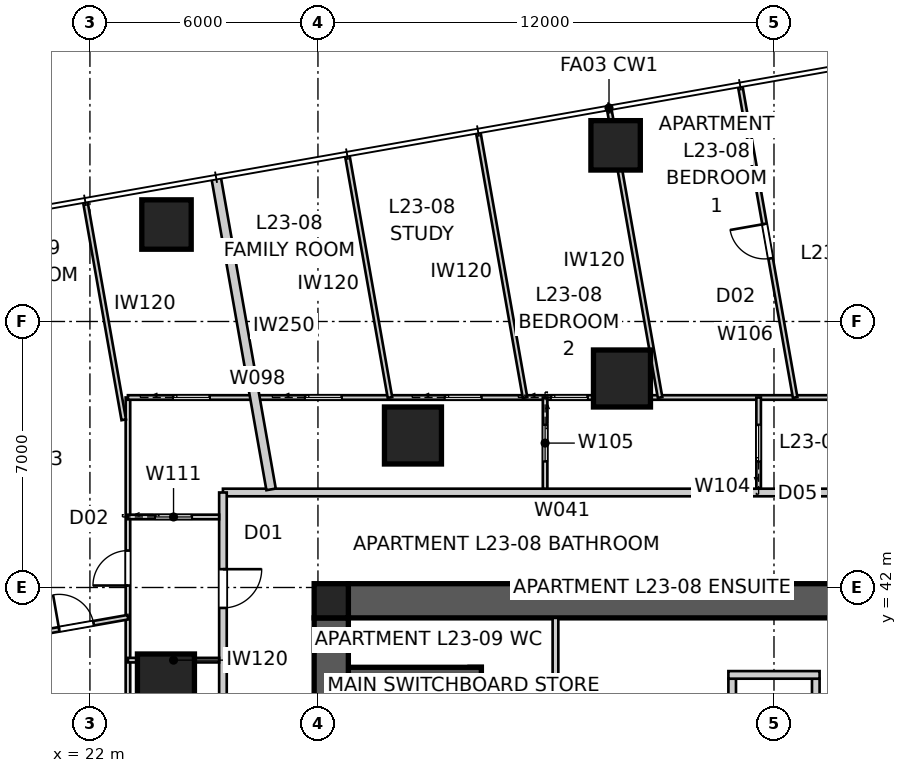
"""IFC4 building model, lengths in metres.
Left out: names, types, materials, properties, quantities, classifications, styles, units other than length and angle.
Written with IfcOpenShell. Run it as: python <this file> out.ifc"""

import sys

from ifc_helpers import new_model, si_unit, direction, frame, frame_2d, origin, origin_2d, place, context, subcontext, project, spatial, polyline, rectangle, outline, extrude, element, fill, save


model = new_model("IFC4")
c1 = context("Model", 3, precision=1e-05, world=origin(), true_north=direction((0.0, 1.0)))
c2 = subcontext(c1, "Body", "Model", "MODEL_VIEW")
j1 = project(units=[si_unit("LENGTHUNIT", "METRE"), si_unit("PLANEANGLEUNIT", "RADIAN")], contexts=[c1])
p1 = place(None, origin())
s1 = spatial("IfcSite", under=j1, at=p1, CompositionType="ELEMENT")
p2 = place(p1, origin())
s2 = spatial("IfcBuilding", under=s1, at=p2, CompositionType="ELEMENT")
p3 = place(p2, frame((0.0, 0.0, 86.2)))
s3 = spatial("IfcBuildingStorey", under=s2, at=p3, CompositionType="ELEMENT", Elevation=86.2)
p4 = place(p3, frame((28.8, 41.65, 0.0), z_axis=(0.0, 0.0, 1.0), x_axis=(1.0, 0.0, 0.0)))
e1 = element("IfcWall", 1, at=p4, inside=s3, PredefinedType="SHEAR", context=c2, shape_type="SweptSolid", body=[
    extrude(outline(polyline([(0.0, -0.45), (22.4, -0.45), (22.4, -0.025), (22.85, -0.025), (22.85, 0.025), (22.4, 0.025), (22.4, 0.45), (0.0, 0.45), (0.0, 0.025), (-0.45, 0.025), (-0.45, -0.025), (0.0, -0.025), (0.0, -0.45)])), origin(), (0.0, 0.0, 1.0), 3.4),
])
p5 = place(p3, frame((28.35, 41.2, 0.0), z_axis=(0.0, 0.0, 1.0), x_axis=(0.0, -1.0, 0.0)))
e2 = element("IfcWall", 2, at=p5, inside=s3, PredefinedType="SHEAR", context=c2, shape_type="SweptSolid", body=[
    extrude(outline(polyline([(0.0, -0.45), (22.4, -0.45), (22.4, -0.025), (22.85, -0.025), (22.85, 0.025), (22.4, 0.025), (22.4, 0.45), (0.0, 0.45), (0.0, 0.025), (-0.45, 0.025), (-0.45, -0.025), (0.0, -0.025), (0.0, -0.45)])), origin(), (0.0, 0.0, 1.0), 3.4),
])
p6 = place(p5, frame((11.14, 0.0, 0.0)))
e3 = element("IfcOpeningElement", 3, at=p6, cuts=e2, PredefinedType="OPENING", context=c2, shape_type="SweptSolid", body=[
    extrude(rectangle(XDim=1.02, YDim=2.4, at=frame_2d((0.51, 1.2))), frame((0.0, 0.46, 0.0), z_axis=(0.0, -1.0, 0.0), x_axis=(1.0, 0.0, 0.0)), (0.0, 0.0, 1.0), 0.92),
])
p7 = place(p3, frame((32.15, 32.2, 0.0), z_axis=(0.0, 0.0, 1.0), x_axis=(0.0, 1.0, 0.0)))
e4 = element("IfcWall", 4, at=p7, inside=s3, PredefinedType="SHEAR", context=c2, shape_type="SweptSolid", body=[
    extrude(rectangle(XDim=7.7, YDim=0.3, at=frame_2d((3.85, 0.0))), origin(), (0.0, 0.0, 1.0), 3.4),
])
p8 = place(p3, frame((28.8, 39.75, 0.0), z_axis=(0.0, 0.0, 1.0), x_axis=(1.0, 0.0, 0.0)))
e5 = element("IfcWall", 5, at=p8, inside=s3, PredefinedType="SHEAR", context=c2, shape_type="SweptSolid", body=[
    extrude(rectangle(XDim=3.5, YDim=0.3, at=frame_2d((1.75, 0.0))), origin(), (0.0, 0.0, 1.0), 3.4),
])
for number, where, z_axis, x_axis in (
    (6, (38.9, 37.6, 0.0), (0.0, 0.0, 1.0), (0.0, 1.0, 0.0)),
    (7, (41.1, 37.6, 0.0), (0.0, 0.0, 1.0), (0.0, 1.0, 0.0)),
):
    element("IfcWall", number, at=place(p3, frame(where, z_axis=z_axis, x_axis=x_axis)), inside=s3, PredefinedType="SOLIDWALL", context=c2, shape_type="SweptSolid", body=[
        extrude(rectangle(XDim=2.0, YDim=0.2, at=frame_2d((1.0, 0.0))), origin(), (0.0, 0.0, 1.0), 3.4),
    ])
p9 = place(p3, frame((38.8, 39.7, 0.0), z_axis=(0.0, 0.0, 1.0), x_axis=(1.0, 0.0, 0.0)))
e8 = element("IfcWall", 8, at=p9, inside=s3, PredefinedType="SOLIDWALL", context=c2, shape_type="SweptSolid", body=[
    extrude(rectangle(XDim=2.4, YDim=0.2, at=frame_2d((1.2, 0.0))), origin(), (0.0, 0.0, 1.0), 3.4),
])
p10 = place(p3, frame((28.35, 41.65, 0.0), z_axis=(0.0, 0.0, 1.0), x_axis=(1.0, 0.0, 0.0)))
e9 = element("IfcColumn", 9, at=p10, inside=s3, PredefinedType="COLUMN", context=c2, shape_type="SweptSolid", body=[
    extrude(rectangle(XDim=0.9, YDim=0.9, at=origin_2d()), origin(), (0.0, 0.0, 1.0), 3.4),
])
for number, where, z_axis, x_axis in (
    (10, (35.833, 53.635, 0.0), (0.0, 0.0, 1.0), (1.0, 0.0, 0.0)),
    (11, (24.015, 51.552, 0.0), (0.0, 0.0, 1.0), (1.0, 0.0, 0.0)),
):
    element("IfcColumn", number, at=place(p3, frame(where, z_axis=z_axis, x_axis=x_axis)), inside=s3, PredefinedType="COLUMN", context=c2, shape_type="SweptSolid", body=[
        extrude(rectangle(XDim=1.3, YDim=1.3, at=origin_2d()), origin(), (0.0, 0.0, 1.0), 3.4),
    ])
for number, where, z_axis, x_axis in (
    (12, (36.0, 47.5, 0.0), (0.0, 0.0, 1.0), (1.0, 0.0, 0.0)),
    (13, (30.5, 46.0, 0.0), (0.0, 0.0, 1.0), (1.0, 0.0, 0.0)),
    (14, (24.0, 39.5, 0.0), (0.0, 0.0, 1.0), (1.0, 0.0, 0.0)),
):
    element("IfcColumn", number, at=place(p3, frame(where, z_axis=z_axis, x_axis=x_axis)), inside=s3, PredefinedType="COLUMN", context=c2, shape_type="SweptSolid", body=[
        extrude(rectangle(XDim=1.5, YDim=1.5, at=origin_2d()), origin(), (0.0, 0.0, 1.0), 3.4),
    ])
p11 = place(p3, frame((54.5, 44.5, 0.0), z_axis=(0.0, 0.0, 1.0), x_axis=(-1.0, 0.0, 0.0)))
e15 = element("IfcWall", 15, at=p11, inside=s3, PredefinedType="PARTITIONING", context=c2, shape_type="SweptSolid", body=[
    extrude(rectangle(XDim=29.0, YDim=0.2, at=frame_2d((14.5, 0.0))), origin(), (0.0, 0.0, 1.0), 3.25),
])
p12 = place(p11, frame((10.129, 0.0, 0.0)))
e16 = element("IfcOpeningElement", 16, at=p12, cuts=e15, PredefinedType="OPENING", context=c2, shape_type="SweptSolid", body=[
    extrude(rectangle(XDim=1.02, YDim=2.34, at=frame_2d((0.51, 1.17))), frame((0.0, 0.11, 0.0), z_axis=(0.0, -1.0, 0.0), x_axis=(1.0, 0.0, 0.0)), (0.0, 0.0, 1.0), 0.22),
])
p13 = place(p11, frame((3.065, 0.0, 0.0)))
e17 = element("IfcOpeningElement", 17, at=p13, cuts=e15, PredefinedType="OPENING", context=c2, shape_type="SweptSolid", body=[
    extrude(rectangle(XDim=1.02, YDim=2.1, at=frame_2d((0.51, 1.05))), frame((0.0, 0.11, 0.0), z_axis=(0.0, -1.0, 0.0), x_axis=(1.0, 0.0, 0.0)), (0.0, 0.0, 1.0), 0.22),
])
p14 = place(p3, frame((25.5, 44.5, 0.0), z_axis=(0.0, 0.0, 1.0), x_axis=(0.0, -1.0, 0.0)))
e18 = element("IfcWall", 18, at=p14, inside=s3, PredefinedType="PARTITIONING", context=c2, shape_type="SweptSolid", body=[
    extrude(rectangle(XDim=29.0, YDim=0.2, at=frame_2d((14.5, 0.0))), origin(), (0.0, 0.0, 1.0), 3.25),
])
p15 = place(p14, frame((12.263, 0.0, 0.0)))
e19 = element("IfcOpeningElement", 19, at=p15, cuts=e18, PredefinedType="OPENING", context=c2, shape_type="SweptSolid", body=[
    extrude(rectangle(XDim=1.02, YDim=2.34, at=frame_2d((0.51, 1.17))), frame((0.0, 0.11, 0.0), z_axis=(0.0, -1.0, 0.0), x_axis=(1.0, 0.0, 0.0)), (0.0, 0.0, 1.0), 0.22),
])
p16 = place(p14, frame((2.018, 0.0, 0.0)))
e20 = element("IfcOpeningElement", 20, at=p16, cuts=e18, PredefinedType="OPENING", context=c2, shape_type="SweptSolid", body=[
    extrude(rectangle(XDim=1.02, YDim=2.34, at=frame_2d((0.51, 1.17))), frame((0.0, 0.11, 0.0), z_axis=(0.0, -1.0, 0.0), x_axis=(1.0, 0.0, 0.0)), (0.0, 0.0, 1.0), 0.22),
])
p17 = place(p3, frame((25.318, 52.797, 0.0), z_axis=(0.0, 0.0, 1.0), x_axis=(0.173651756605, -0.984807121942, 0.0)))
e21 = element("IfcWall", 21, at=p17, inside=s3, PredefinedType="PARTITIONING", context=c2, shape_type="SweptSolid", body=[
    extrude(rectangle(XDim=8.341, YDim=0.25, at=frame_2d((4.171, 0.0))), origin(), (0.0, 0.0, 1.0), 3.25),
])
p18 = place(p3, frame((34.25, 41.2, 0.0), z_axis=(0.0, 0.0, 1.0), x_axis=(0.0, -1.0, 0.0)))
e22 = element("IfcWall", 22, at=p18, inside=s3, PredefinedType="SOLIDWALL", context=c2, shape_type="SweptSolid", body=[
    extrude(rectangle(XDim=5.95, YDim=0.15, at=frame_2d((2.975, 0.0))), origin(), (0.0, 0.0, 1.0), 3.25),
])
p19 = place(p18, frame((2.515, 0.0, 0.0)))
e23 = element("IfcOpeningElement", 23, at=p19, cuts=e22, PredefinedType="OPENING", context=c2, shape_type="SweptSolid", body=[
    extrude(rectangle(XDim=0.92, YDim=2.1, at=frame_2d((0.46, 1.05))), frame((0.0, 0.085, 0.0), z_axis=(0.0, -1.0, 0.0), x_axis=(1.0, 0.0, 0.0)), (0.0, 0.0, 1.0), 0.17),
])
p20 = place(p3, frame((23.0, 13.0, 0.0), z_axis=(0.0, 0.0, 1.0), x_axis=(0.0, 1.0, 0.0)))
e24 = element("IfcWall", 24, at=p20, inside=s3, PredefinedType="PARTITIONING", context=c2, shape_type="SweptSolid", body=[
    extrude(rectangle(XDim=34.0, YDim=0.12, at=frame_2d((17.0, 0.0))), origin(), (0.0, 0.0, 1.0), 2.55),
])
p21 = place(p20, frame((18.848, 0.0, 0.0)))
e25 = element("IfcOpeningElement", 25, at=p21, cuts=e24, PredefinedType="OPENING", context=c2, shape_type="SweptSolid", body=[
    extrude(rectangle(XDim=0.92, YDim=2.34, at=frame_2d((0.46, 1.17))), frame((0.0, 0.07, 0.0), z_axis=(0.0, -1.0, 0.0), x_axis=(1.0, 0.0, 0.0)), (0.0, 0.0, 1.0), 0.14),
])
p22 = place(p20, frame((16.284, 0.0, 0.0)))
e26 = element("IfcOpeningElement", 26, at=p22, cuts=e24, PredefinedType="OPENING", context=c2, shape_type="SweptSolid", body=[
    extrude(rectangle(XDim=0.92, YDim=2.34, at=frame_2d((0.46, 1.17))), frame((0.0, 0.07, 0.0), z_axis=(0.0, -1.0, 0.0), x_axis=(1.0, 0.0, 0.0)), (0.0, 0.0, 1.0), 0.14),
])
p23 = place(p20, frame((29.052, 0.0, 0.0)))
e27 = element("IfcOpeningElement", 27, at=p23, cuts=e24, PredefinedType="OPENING", context=c2, shape_type="SweptSolid", body=[
    extrude(rectangle(XDim=0.92, YDim=2.34, at=frame_2d((0.46, 1.17))), frame((0.0, 0.07, 0.0), z_axis=(0.0, -1.0, 0.0), x_axis=(1.0, 0.0, 0.0)), (0.0, 0.0, 1.0), 0.14),
])
p24 = place(p20, frame((1.196, 0.0, 0.0)))
e28 = element("IfcOpeningElement", 28, at=p24, cuts=e24, PredefinedType="OPENING", context=c2, shape_type="SweptSolid", body=[
    extrude(rectangle(XDim=0.92, YDim=2.34, at=frame_2d((0.46, 1.17))), frame((0.0, 0.07, 0.0), z_axis=(0.0, -1.0, 0.0), x_axis=(1.0, 0.0, 0.0)), (0.0, 0.0, 1.0), 0.14),
])
p25 = place(p20, frame((3.633, 0.0, 0.0)))
e29 = element("IfcOpeningElement", 29, at=p25, cuts=e24, PredefinedType="OPENING", context=c2, shape_type="SweptSolid", body=[
    extrude(rectangle(XDim=0.92, YDim=2.34, at=frame_2d((0.46, 1.17))), frame((0.0, 0.07, 0.0), z_axis=(0.0, -1.0, 0.0), x_axis=(1.0, 0.0, 0.0)), (0.0, 0.0, 1.0), 0.14),
])
p26 = place(p20, frame((23.619, 0.0, 0.0)))
e30 = element("IfcOpeningElement", 30, at=p26, cuts=e24, PredefinedType="OPENING", context=c2, shape_type="SweptSolid", body=[
    extrude(rectangle(XDim=0.96, YDim=2.1, at=frame_2d((0.48, 1.05))), frame((0.0, 0.07, 0.0), z_axis=(0.0, -1.0, 0.0), x_axis=(1.0, 0.0, 0.0)), (0.0, 0.0, 1.0), 0.14),
])
p27 = place(p3, frame((23.0, 47.0, 0.0), z_axis=(0.0, 0.0, 1.0), x_axis=(1.0, 0.0, 0.0)))
e31 = element("IfcWall", 31, at=p27, inside=s3, PredefinedType="PARTITIONING", context=c2, shape_type="SweptSolid", body=[
    extrude(rectangle(XDim=24.771, YDim=0.12, at=frame_2d((12.386, 0.0))), origin(), (0.0, 0.0, 1.0), 2.55),
])
p28 = place(p27, frame((21.825, 0.0, 0.0)))
e32 = element("IfcOpeningElement", 32, at=p28, cuts=e31, PredefinedType="OPENING", context=c2, shape_type="SweptSolid", body=[
    extrude(rectangle(XDim=0.92, YDim=2.34, at=frame_2d((0.46, 1.17))), frame((0.0, 0.07, 0.0), z_axis=(0.0, -1.0, 0.0), x_axis=(1.0, 0.0, 0.0)), (0.0, 0.0, 1.0), 0.14),
])
p29 = place(p27, frame((11.135, 0.0, 0.0)))
e33 = element("IfcOpeningElement", 33, at=p29, cuts=e31, PredefinedType="OPENING", context=c2, shape_type="SweptSolid", body=[
    extrude(rectangle(XDim=0.96, YDim=2.1, at=frame_2d((0.48, 1.05))), frame((0.0, 0.07, 0.0), z_axis=(0.0, -1.0, 0.0), x_axis=(1.0, 0.0, 0.0)), (0.0, 0.0, 1.0), 0.14),
])
p30 = place(p27, frame((1.19, 0.0, 0.0)))
e34 = element("IfcOpeningElement", 34, at=p30, cuts=e31, PredefinedType="OPENING", context=c2, shape_type="SweptSolid", body=[
    extrude(rectangle(XDim=0.96, YDim=2.1, at=frame_2d((0.48, 1.05))), frame((0.0, 0.07, 0.0), z_axis=(0.0, -1.0, 0.0), x_axis=(1.0, 0.0, 0.0)), (0.0, 0.0, 1.0), 0.14),
])
p31 = place(p27, frame((8.342, 0.0, 0.0)))
e35 = element("IfcOpeningElement", 35, at=p31, cuts=e31, PredefinedType="OPENING", context=c2, shape_type="SweptSolid", body=[
    extrude(rectangle(XDim=0.96, YDim=2.1, at=frame_2d((0.48, 1.05))), frame((0.0, 0.07, 0.0), z_axis=(0.0, -1.0, 0.0), x_axis=(1.0, 0.0, 0.0)), (0.0, 0.0, 1.0), 0.14),
])
p32 = place(p27, frame((4.663, 0.0, 0.0)))
e36 = element("IfcOpeningElement", 36, at=p32, cuts=e31, PredefinedType="OPENING", context=c2, shape_type="SweptSolid", body=[
    extrude(rectangle(XDim=0.96, YDim=2.1, at=frame_2d((0.48, 1.05))), frame((0.0, 0.07, 0.0), z_axis=(0.0, -1.0, 0.0), x_axis=(1.0, 0.0, 0.0)), (0.0, 0.0, 1.0), 0.14),
])
p33 = place(p3, frame((39.596, 44.6, 0.0), z_axis=(0.0, 0.0, 1.0), x_axis=(0.0, 1.0, 0.0)))
e37 = element("IfcWall", 37, at=p33, inside=s3, PredefinedType="PARTITIONING", context=c2, shape_type="SweptSolid", body=[
    extrude(rectangle(XDim=2.4, YDim=0.12, at=frame_2d((1.2, 0.0))), origin(), (0.0, 0.0, 1.0), 3.25),
])
p34 = place(p33, frame((0.72, 0.0, 0.0)))
e38 = element("IfcOpeningElement", 38, at=p34, cuts=e37, PredefinedType="OPENING", context=c2, shape_type="SweptSolid", body=[
    extrude(rectangle(XDim=0.96, YDim=2.1, at=frame_2d((0.48, 1.05))), frame((0.0, 0.07, 0.0), z_axis=(0.0, -1.0, 0.0), x_axis=(1.0, 0.0, 0.0)), (0.0, 0.0, 1.0), 0.14),
])
p35 = place(p3, frame((33.977, 47.0, 0.0), z_axis=(0.0, 0.0, 1.0), x_axis=(0.0, -1.0, 0.0)))
e39 = element("IfcWall", 39, at=p35, inside=s3, PredefinedType="PARTITIONING", context=c2, shape_type="SweptSolid", body=[
    extrude(rectangle(XDim=2.4, YDim=0.12, at=frame_2d((1.2, 0.0))), origin(), (0.0, 0.0, 1.0), 3.25),
])
p36 = place(p35, frame((0.72, 0.0, 0.0)))
e40 = element("IfcOpeningElement", 40, at=p36, cuts=e39, PredefinedType="OPENING", context=c2, shape_type="SweptSolid", body=[
    extrude(rectangle(XDim=0.96, YDim=2.1, at=frame_2d((0.48, 1.05))), frame((0.0, 0.07, 0.0), z_axis=(0.0, -1.0, 0.0), x_axis=(1.0, 0.0, 0.0)), (0.0, 0.0, 1.0), 0.14),
])
p37 = place(p3, frame((40.556, 47.0, 0.0), z_axis=(0.0, 0.0, 1.0), x_axis=(-0.173647980238, 0.984807787824, 0.0)))
e41 = element("IfcWall", 41, at=p37, inside=s3, PredefinedType="PARTITIONING", context=c2, shape_type="SweptSolid", body=[
    extrude(rectangle(XDim=8.315, YDim=0.12, at=frame_2d((4.157, 0.0))), origin(), (0.0, 0.0, 1.0), 3.25),
])
p38 = place(p37, frame((3.718, 0.0, 0.0)))
e42 = element("IfcOpeningElement", 42, at=p38, cuts=e41, PredefinedType="OPENING", context=c2, shape_type="SweptSolid", body=[
    extrude(rectangle(XDim=0.92, YDim=2.34, at=frame_2d((0.46, 1.17))), frame((0.0, 0.07, 0.0), z_axis=(0.0, -1.0, 0.0), x_axis=(1.0, 0.0, 0.0)), (0.0, 0.0, 1.0), 0.14),
])
p39 = place(p3, frame((37.002, 47.0, 0.0), z_axis=(0.0, 0.0, 1.0), x_axis=(-0.173644207293, 0.984808453088, 0.0)))
e43 = element("IfcWall", 43, at=p39, inside=s3, PredefinedType="PARTITIONING", context=c2, shape_type="SweptSolid", body=[
    extrude(rectangle(XDim=7.698, YDim=0.12, at=frame_2d((3.849, 0.0))), origin(), (0.0, 0.0, 1.0), 3.25),
])
p40 = place(p3, frame((33.448, 47.0, 0.0), z_axis=(0.0, 0.0, 1.0), x_axis=(-0.173639776761, 0.984809234282, 0.0)))
e44 = element("IfcWall", 44, at=p40, inside=s3, PredefinedType="PARTITIONING", context=c2, shape_type="SweptSolid", body=[
    extrude(rectangle(XDim=7.081, YDim=0.12, at=frame_2d((3.541, 0.0))), origin(), (0.0, 0.0, 1.0), 3.25),
])
p41 = place(p3, frame((29.895, 47.0, 0.0), z_axis=(0.0, 0.0, 1.0), x_axis=(-0.173640959323, 0.984809025774, 0.0)))
e45 = element("IfcWall", 45, at=p41, inside=s3, PredefinedType="PARTITIONING", context=c2, shape_type="SweptSolid", body=[
    extrude(rectangle(XDim=6.463, YDim=0.12, at=frame_2d((3.232, 0.0))), origin(), (0.0, 0.0, 1.0), 3.25),
])
p42 = place(p3, frame((25.4, 40.088, 0.0), z_axis=(0.0, 0.0, 1.0), x_axis=(-1.0, 0.0, 0.0)))
e46 = element("IfcWall", 46, at=p42, inside=s3, PredefinedType="PARTITIONING", context=c2, shape_type="SweptSolid", body=[
    extrude(rectangle(XDim=2.4, YDim=0.12, at=frame_2d((1.2, 0.0))), origin(), (0.0, 0.0, 1.0), 3.25),
])
p43 = place(p3, frame((23.0, 43.856, 0.0), z_axis=(0.0, 0.0, 1.0), x_axis=(1.0, 0.0, 0.0)))
e47 = element("IfcWall", 47, at=p43, inside=s3, PredefinedType="PARTITIONING", context=c2, shape_type="SweptSolid", body=[
    extrude(rectangle(XDim=2.4, YDim=0.12, at=frame_2d((1.2, 0.0))), origin(), (0.0, 0.0, 1.0), 3.25),
])
p44 = place(p43, frame((0.72, 0.0, 0.0)))
e48 = element("IfcOpeningElement", 48, at=p44, cuts=e47, PredefinedType="OPENING", context=c2, shape_type="SweptSolid", body=[
    extrude(rectangle(XDim=0.96, YDim=2.1, at=frame_2d((0.48, 1.05))), frame((0.0, 0.07, 0.0), z_axis=(0.0, -1.0, 0.0), x_axis=(1.0, 0.0, 0.0)), (0.0, 0.0, 1.0), 0.14),
])
p45 = place(p3, frame((12.988, 39.453, 0.0), z_axis=(0.0, 0.0, 1.0), x_axis=(0.984807724889, 0.173648337162, 0.0)))
e49 = element("IfcWall", 49, at=p45, inside=s3, PredefinedType="PARTITIONING", context=c2, shape_type="SweptSolid", body=[
    extrude(rectangle(XDim=10.167, YDim=0.12, at=frame_2d((5.083, 0.0))), origin(), (0.0, 0.0, 1.0), 2.638),
])
p46 = place(p45, frame((8.328, 0.0, 0.0)))
e50 = element("IfcOpeningElement", 50, at=p46, cuts=e49, PredefinedType="OPENING", context=c2, shape_type="SweptSolid", body=[
    extrude(rectangle(XDim=0.92, YDim=2.34, at=frame_2d((0.46, 1.17))), frame((0.0, 0.07, 0.0), z_axis=(0.0, -1.0, 0.0), x_axis=(1.0, 0.0, 0.0)), (0.0, 0.0, 1.0), 0.14),
])
p47 = place(p3, frame((21.878, 52.15, 0.0), z_axis=(0.0, 0.0, 1.0), x_axis=(0.173634707655, -0.984810128044, 0.0)))
e51 = element("IfcWall", 51, at=p47, inside=s3, PredefinedType="PARTITIONING", context=c2, shape_type="SweptSolid", body=[
    extrude(rectangle(XDim=5.825, YDim=0.12, at=frame_2d((2.913, 0.0))), origin(), (0.0, 0.0, 1.0), 2.638),
])
p48 = place(p16, origin())
e52 = element("IfcDoor", 52, at=p48, inside=s3, OperationType="SINGLE_SWING_LEFT", PredefinedType="DOOR", context=c2, shape_type="SweptSolid", body=[
    extrude(rectangle(XDim=1.02, YDim=2.34, at=frame_2d((0.51, 1.17))), frame((0.0, 0.025, 0.0), z_axis=(0.0, -1.0, 0.0), x_axis=(1.0, 0.0, 0.0)), (0.0, 0.0, 1.0), 0.05),
])
fill(e20, e52)
p49 = place(p34, origin())
e53 = element("IfcDoor", 53, at=p49, inside=s3, OperationType="SLIDING_TO_LEFT", PredefinedType="DOOR", context=c2, shape_type="SweptSolid", body=[
    extrude(rectangle(XDim=0.96, YDim=2.1, at=frame_2d((0.48, 1.05))), frame((0.0, 0.025, 0.0), z_axis=(0.0, -1.0, 0.0), x_axis=(1.0, 0.0, 0.0)), (0.0, 0.0, 1.0), 0.05),
])
fill(e38, e53)
p50 = place(p23, origin())
e54 = element("IfcDoor", 54, at=p50, inside=s3, OperationType="SINGLE_SWING_LEFT", PredefinedType="DOOR", context=c2, shape_type="SweptSolid", body=[
    extrude(rectangle(XDim=0.92, YDim=2.34, at=frame_2d((0.46, 1.17))), frame((0.0, 0.025, 0.0), z_axis=(0.0, -1.0, 0.0), x_axis=(1.0, 0.0, 0.0)), (0.0, 0.0, 1.0), 0.05),
])
fill(e27, e54)
p51 = place(p44, origin())
e55 = element("IfcDoor", 55, at=p51, inside=s3, OperationType="SLIDING_TO_LEFT", PredefinedType="DOOR", context=c2, shape_type="SweptSolid", body=[
    extrude(rectangle(XDim=0.96, YDim=2.1, at=frame_2d((0.48, 1.05))), frame((0.0, 0.025, 0.0), z_axis=(0.0, -1.0, 0.0), x_axis=(1.0, 0.0, 0.0)), (0.0, 0.0, 1.0), 0.05),
])
fill(e48, e55)
p52 = place(p38, origin())
e56 = element("IfcDoor", 56, at=p52, inside=s3, OperationType="SINGLE_SWING_RIGHT", PredefinedType="DOOR", context=c2, shape_type="SweptSolid", body=[
    extrude(rectangle(XDim=0.92, YDim=2.34, at=frame_2d((0.46, 1.17))), frame((0.0, 0.025, 0.0), z_axis=(0.0, -1.0, 0.0), x_axis=(1.0, 0.0, 0.0)), (0.0, 0.0, 1.0), 0.05),
])
fill(e42, e56)
p53 = place(p29, origin())
e57 = element("IfcDoor", 57, at=p53, inside=s3, OperationType="SLIDING_TO_LEFT", PredefinedType="DOOR", context=c2, shape_type="SweptSolid", body=[
    extrude(rectangle(XDim=0.96, YDim=2.1, at=frame_2d((0.48, 1.05))), frame((0.0, 0.025, 0.0), z_axis=(0.0, -1.0, 0.0), x_axis=(1.0, 0.0, 0.0)), (0.0, 0.0, 1.0), 0.05),
])
fill(e33, e57)
p54 = place(p36, origin())
e58 = element("IfcDoor", 58, at=p54, inside=s3, OperationType="SLIDING_TO_LEFT", PredefinedType="DOOR", context=c2, shape_type="SweptSolid", body=[
    extrude(rectangle(XDim=0.96, YDim=2.1, at=frame_2d((0.48, 1.05))), frame((0.0, 0.025, 0.0), z_axis=(0.0, -1.0, 0.0), x_axis=(1.0, 0.0, 0.0)), (0.0, 0.0, 1.0), 0.05),
])
fill(e40, e58)
p55 = place(p30, origin())
e59 = element("IfcDoor", 59, at=p55, inside=s3, OperationType="SLIDING_TO_LEFT", PredefinedType="DOOR", context=c2, shape_type="SweptSolid", body=[
    extrude(rectangle(XDim=0.96, YDim=2.1, at=frame_2d((0.48, 1.05))), frame((0.0, 0.025, 0.0), z_axis=(0.0, -1.0, 0.0), x_axis=(1.0, 0.0, 0.0)), (0.0, 0.0, 1.0), 0.05),
])
fill(e34, e59)
p56 = place(p31, origin())
e60 = element("IfcDoor", 60, at=p56, inside=s3, OperationType="SLIDING_TO_LEFT", PredefinedType="DOOR", context=c2, shape_type="SweptSolid", body=[
    extrude(rectangle(XDim=0.96, YDim=2.1, at=frame_2d((0.48, 1.05))), frame((0.0, 0.025, 0.0), z_axis=(0.0, -1.0, 0.0), x_axis=(1.0, 0.0, 0.0)), (0.0, 0.0, 1.0), 0.05),
])
fill(e35, e60)
p57 = place(p32, origin())
e61 = element("IfcDoor", 61, at=p57, inside=s3, OperationType="SLIDING_TO_LEFT", PredefinedType="DOOR", context=c2, shape_type="SweptSolid", body=[
    extrude(rectangle(XDim=0.96, YDim=2.1, at=frame_2d((0.48, 1.05))), frame((0.0, 0.025, 0.0), z_axis=(0.0, -1.0, 0.0), x_axis=(1.0, 0.0, 0.0)), (0.0, 0.0, 1.0), 0.05),
])
fill(e36, e61)
p58 = place(p46, origin())
e62 = element("IfcDoor", 62, at=p58, inside=s3, OperationType="SINGLE_SWING_LEFT", PredefinedType="DOOR", context=c2, shape_type="SweptSolid", body=[
    extrude(rectangle(XDim=0.92, YDim=2.34, at=frame_2d((0.46, 1.17))), frame((0.0, 0.025, 0.0), z_axis=(0.0, -1.0, 0.0), x_axis=(1.0, 0.0, 0.0)), (0.0, 0.0, 1.0), 0.05),
])
fill(e50, e62)
save(model, sys.argv[1])
